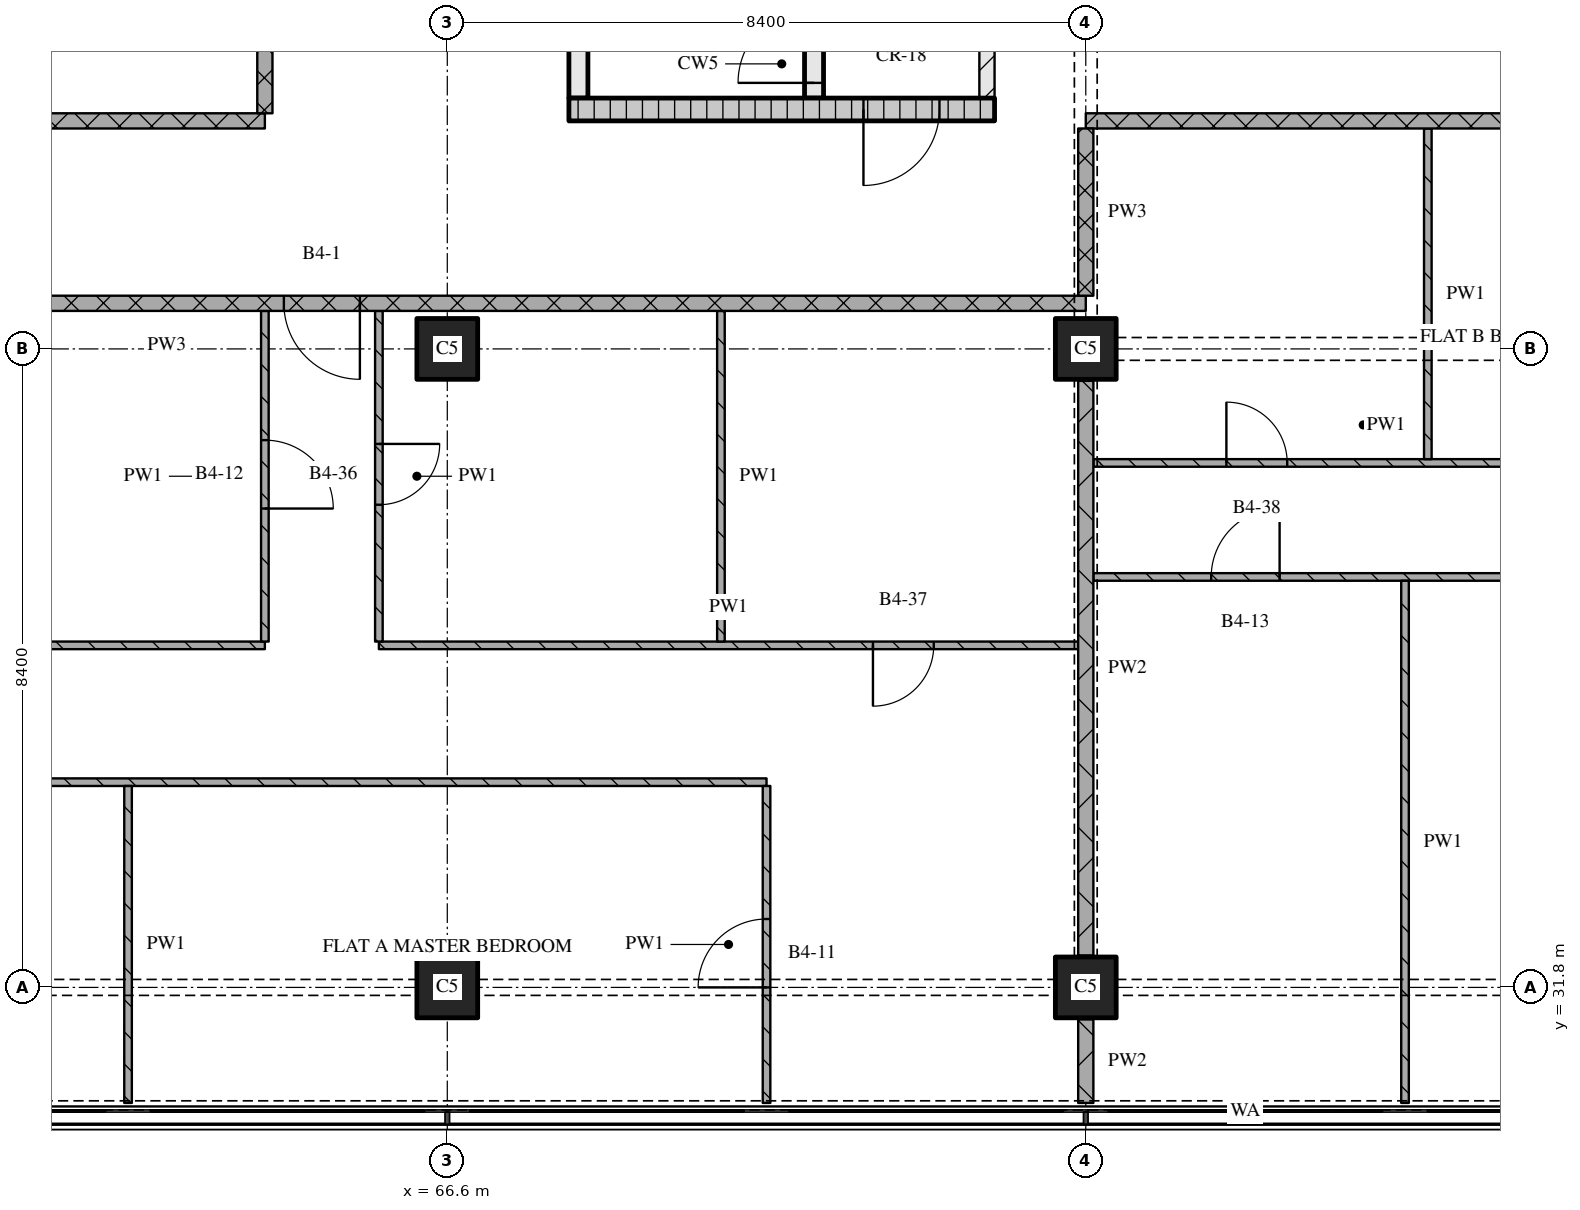
"""IFC4 building model, lengths in metres.
Left out: names, types, materials, properties, quantities, classifications, styles, units other than length and angle.
Written with IfcOpenShell. Run it as: python <this file> out.ifc"""

import sys

from ifc_helpers import new_model, si_unit, direction, frame, frame_2d, origin, origin_2d, place, context, subcontext, project, spatial, rectangle, extrude, element, fill, save


model = new_model("IFC4")
c1 = context("Model", 3, precision=1e-05, world=origin(), true_north=direction((0.0, 1.0)))
c2 = subcontext(c1, "Body", "Model", "MODEL_VIEW")
j1 = project(units=[si_unit("LENGTHUNIT", "METRE"), si_unit("PLANEANGLEUNIT", "RADIAN")], contexts=[c1])
p1 = place(None, origin())
s1 = spatial("IfcSite", under=j1, at=p1, CompositionType="ELEMENT")
p2 = place(p1, origin())
s2 = spatial("IfcBuilding", under=s1, at=p2, CompositionType="ELEMENT")
p3 = place(p2, frame((0.0, 0.0, 131.25)))
s3 = spatial("IfcBuildingStorey", under=s2, at=p3, CompositionType="ELEMENT", Elevation=131.25)
for number, where, z_axis, x_axis in (
    (1, (66.6, 31.8, 0.0), (0.0, 0.0, 1.0), (1.0, 0.0, 0.0)),
    (2, (66.6, 40.2, 0.0), (0.0, 0.0, 1.0), (1.0, 0.0, 0.0)),
    (3, (75.0, 31.8, 0.0), (0.0, 0.0, 1.0), (1.0, 0.0, 0.0)),
    (4, (75.0, 40.2, 0.0), (0.0, 0.0, 1.0), (1.0, 0.0, 0.0)),
):
    element("IfcColumn", number, at=place(p3, frame(where, z_axis=z_axis, x_axis=x_axis)), inside=s3, PredefinedType="COLUMN", context=c2, shape_type="SweptSolid", body=[
        extrude(rectangle(XDim=0.8, YDim=0.8, at=origin_2d()), origin(), (0.0, 0.0, 1.0), 3.6),
    ])
p4 = place(p3, frame((68.2, 43.35, 0.0), z_axis=(0.0, 0.0, 1.0), x_axis=(1.0, 0.0, 0.0)))
e5 = element("IfcWall", 5, at=p4, inside=s3, PredefinedType="SOLIDWALL", context=c2, shape_type="SweptSolid", body=[
    extrude(rectangle(XDim=5.6, YDim=0.3, at=frame_2d((2.8, 0.0))), origin(), (0.0, 0.0, 1.0), 3.32),
])
p5 = place(p4, frame((3.875, 0.0, 0.0)))
e6 = element("IfcOpeningElement", 6, at=p5, cuts=e5, PredefinedType="OPENING", context=c2, shape_type="SweptSolid", body=[
    extrude(rectangle(XDim=1.0, YDim=2.1, at=frame_2d((0.5, 1.05))), frame((0.0, 0.16, 0.0), z_axis=(0.0, -1.0, 0.0), x_axis=(1.0, 0.0, 0.0)), (0.0, 0.0, 1.0), 0.32),
])
p6 = place(p3, frame((68.325, 43.5, 0.0), z_axis=(0.0, 0.0, 1.0), x_axis=(0.0, 1.0, 0.0)))
e7 = element("IfcWall", 7, at=p6, inside=s3, PredefinedType="SOLIDWALL", context=c2, shape_type="SweptSolid", body=[
    extrude(rectangle(XDim=6.9, YDim=0.25, at=frame_2d((3.45, 0.0))), origin(), (0.0, 0.0, 1.0), 3.32),
])
p7 = place(p3, frame((71.425, 43.5, 0.0), z_axis=(0.0, 0.0, 1.0), x_axis=(0.0, 1.0, 0.0)))
e8 = element("IfcWall", 8, at=p7, inside=s3, PredefinedType="SOLIDWALL", context=c2, shape_type="SweptSolid", body=[
    extrude(rectangle(XDim=6.9, YDim=0.25, at=frame_2d((3.45, 0.0))), origin(), (0.0, 0.0, 1.0), 3.32),
])
p8 = place(p7, frame((0.2, 0.0, 0.0)))
e9 = element("IfcOpeningElement", 9, at=p8, cuts=e8, PredefinedType="OPENING", context=c2, shape_type="SweptSolid", body=[
    extrude(rectangle(XDim=1.0, YDim=2.1, at=frame_2d((0.5, 1.05))), frame((0.0, 0.135, 0.0), z_axis=(0.0, -1.0, 0.0), x_axis=(1.0, 0.0, 0.0)), (0.0, 0.0, 1.0), 0.27),
])
p9 = place(p3, frame((73.7, 43.5, 0.0), z_axis=(0.0, 0.0, 1.0), x_axis=(0.0, 1.0, 0.0)))
e10 = element("IfcWall", 10, at=p9, inside=s3, PredefinedType="PARTITIONING", context=c2, shape_type="SweptSolid", body=[
    extrude(rectangle(XDim=6.9, YDim=0.2, at=frame_2d((3.45, 0.0))), origin(), (0.0, 0.0, 1.0), 3.32),
])
p10 = place(p9, frame((1.0, 0.0, 0.0)))
e11 = element("IfcOpeningElement", 11, at=p10, cuts=e10, PredefinedType="OPENING", context=c2, shape_type="SweptSolid", body=[
    extrude(rectangle(XDim=1.0, YDim=2.1, at=frame_2d((0.5, 1.05))), frame((0.0, 0.11, 0.0), z_axis=(0.0, -1.0, 0.0), x_axis=(1.0, 0.0, 0.0)), (0.0, 0.0, 1.0), 0.22),
])
p11 = place(p3, frame((70.8, 34.5, 0.0), z_axis=(0.0, 0.0, 1.0), x_axis=(-1.0, 0.0, 0.0)))
e12 = element("IfcWall", 12, at=p11, inside=s3, PredefinedType="PARTITIONING", context=c2, shape_type="SweptSolid", body=[
    extrude(rectangle(XDim=22.52, YDim=0.1, at=frame_2d((11.26, 0.0))), origin(), (0.0, 0.0, 1.0), 3.32),
])
p12 = place(p11, frame((10.05, 0.0, 0.0)))
e13 = element("IfcOpeningElement", 13, at=p12, cuts=e12, PredefinedType="OPENING", context=c2, shape_type="SweptSolid", body=[
    extrude(rectangle(XDim=0.9, YDim=2.1, at=frame_2d((0.45, 1.05))), frame((0.0, 0.06, 0.0), z_axis=(0.0, -1.0, 0.0), x_axis=(1.0, 0.0, 0.0)), (0.0, 0.0, 1.0), 0.12),
])
p13 = place(p11, frame((14.25, 0.0, 0.0)))
e14 = element("IfcOpeningElement", 14, at=p13, cuts=e12, PredefinedType="OPENING", context=c2, shape_type="SweptSolid", body=[
    extrude(rectangle(XDim=0.9, YDim=2.1, at=frame_2d((0.45, 1.05))), frame((0.0, 0.06, 0.0), z_axis=(0.0, -1.0, 0.0), x_axis=(1.0, 0.0, 0.0)), (0.0, 0.0, 1.0), 0.12),
])
p14 = place(p11, frame((17.654, 0.0, 0.0)))
e15 = element("IfcOpeningElement", 15, at=p14, cuts=e12, PredefinedType="OPENING", context=c2, shape_type="SweptSolid", body=[
    extrude(rectangle(XDim=0.9, YDim=2.1, at=frame_2d((0.45, 1.05))), frame((0.0, 0.06, 0.0), z_axis=(0.0, -1.0, 0.0), x_axis=(1.0, 0.0, 0.0)), (0.0, 0.0, 1.0), 0.12),
])
p15 = place(p3, frame((55.5, 36.3, 0.0), z_axis=(0.0, 0.0, 1.0), x_axis=(1.0, 0.0, 0.0)))
e16 = element("IfcWall", 16, at=p15, inside=s3, PredefinedType="PARTITIONING", context=c2, shape_type="SweptSolid", body=[
    extrude(rectangle(XDim=8.7, YDim=0.1, at=frame_2d((4.35, 0.0))), origin(), (0.0, 0.0, 1.0), 3.32),
])
p16 = place(p3, frame((65.7, 36.3, 0.0), z_axis=(0.0, 0.0, 1.0), x_axis=(1.0, 0.0, 0.0)))
e17 = element("IfcWall", 17, at=p16, inside=s3, PredefinedType="PARTITIONING", context=c2, shape_type="SweptSolid", body=[
    extrude(rectangle(XDim=9.2, YDim=0.1, at=frame_2d((4.6, 0.0))), origin(), (0.0, 0.0, 1.0), 3.32),
])
p17 = place(p16, frame((6.5, 0.0, 0.0)))
e18 = element("IfcOpeningElement", 18, at=p17, cuts=e17, PredefinedType="OPENING", context=c2, shape_type="SweptSolid", body=[
    extrude(rectangle(XDim=0.8, YDim=2.1, at=frame_2d((0.4, 1.05))), frame((0.0, 0.06, 0.0), z_axis=(0.0, -1.0, 0.0), x_axis=(1.0, 0.0, 0.0)), (0.0, 0.0, 1.0), 0.12),
])
p18 = place(p3, frame((96.0, 37.2, 0.0), z_axis=(0.0, 0.0, 1.0), x_axis=(-1.0, 0.0, 0.0)))
e19 = element("IfcWall", 19, at=p18, inside=s3, PredefinedType="PARTITIONING", context=c2, shape_type="SweptSolid", body=[
    extrude(rectangle(XDim=20.9, YDim=0.1, at=frame_2d((10.45, 0.0))), origin(), (0.0, 0.0, 1.0), 3.32),
])
p19 = place(p18, frame((10.05, 0.0, 0.0)))
e20 = element("IfcOpeningElement", 20, at=p19, cuts=e19, PredefinedType="OPENING", context=c2, shape_type="SweptSolid", body=[
    extrude(rectangle(XDim=0.9, YDim=2.1, at=frame_2d((0.45, 1.05))), frame((0.0, 0.06, 0.0), z_axis=(0.0, -1.0, 0.0), x_axis=(1.0, 0.0, 0.0)), (0.0, 0.0, 1.0), 0.12),
])
p20 = place(p18, frame((14.25, 0.0, 0.0)))
e21 = element("IfcOpeningElement", 21, at=p20, cuts=e19, PredefinedType="OPENING", context=c2, shape_type="SweptSolid", body=[
    extrude(rectangle(XDim=0.9, YDim=2.1, at=frame_2d((0.45, 1.05))), frame((0.0, 0.06, 0.0), z_axis=(0.0, -1.0, 0.0), x_axis=(1.0, 0.0, 0.0)), (0.0, 0.0, 1.0), 0.12),
])
p21 = place(p18, frame((18.45, 0.0, 0.0)))
e22 = element("IfcOpeningElement", 22, at=p21, cuts=e19, PredefinedType="OPENING", context=c2, shape_type="SweptSolid", body=[
    extrude(rectangle(XDim=0.9, YDim=2.1, at=frame_2d((0.45, 1.05))), frame((0.0, 0.06, 0.0), z_axis=(0.0, -1.0, 0.0), x_axis=(1.0, 0.0, 0.0)), (0.0, 0.0, 1.0), 0.12),
])
p22 = place(p3, frame((75.1, 38.7, 0.0), z_axis=(0.0, 0.0, 1.0), x_axis=(1.0, 0.0, 0.0)))
e23 = element("IfcWall", 23, at=p22, inside=s3, PredefinedType="PARTITIONING", context=c2, shape_type="SweptSolid", body=[
    extrude(rectangle(XDim=7.1, YDim=0.1, at=frame_2d((3.55, 0.0))), origin(), (0.0, 0.0, 1.0), 3.32),
])
p23 = place(p22, frame((1.75, 0.0, 0.0)))
e24 = element("IfcOpeningElement", 24, at=p23, cuts=e23, PredefinedType="OPENING", context=c2, shape_type="SweptSolid", body=[
    extrude(rectangle(XDim=0.8, YDim=2.1, at=frame_2d((0.4, 1.05))), frame((0.0, 0.06, 0.0), z_axis=(0.0, -1.0, 0.0), x_axis=(1.0, 0.0, 0.0)), (0.0, 0.0, 1.0), 0.12),
])
p24 = place(p3, frame((75.0, 40.8, 0.0), z_axis=(0.0, 0.0, 1.0), x_axis=(-1.0, 0.0, 0.0)))
e25 = element("IfcWall", 25, at=p24, inside=s3, PredefinedType="PARTITIONING", context=c2, shape_type="SweptSolid", body=[
    extrude(rectangle(XDim=24.18, YDim=0.2, at=frame_2d((12.09, 0.0))), origin(), (0.0, 0.0, 1.0), 3.32),
])
p25 = place(p24, frame((9.55, 0.0, 0.0)))
e26 = element("IfcOpeningElement", 26, at=p25, cuts=e25, PredefinedType="OPENING", context=c2, shape_type="SweptSolid", body=[
    extrude(rectangle(XDim=1.0, YDim=2.1, at=frame_2d((0.5, 1.05))), frame((0.0, 0.11, 0.0), z_axis=(0.0, -1.0, 0.0), x_axis=(1.0, 0.0, 0.0)), (0.0, 0.0, 1.0), 0.22),
])
p26 = place(p3, frame((48.28, 43.2, 0.0), z_axis=(0.0, 0.0, 1.0), x_axis=(1.0, 0.0, 0.0)))
e27 = element("IfcWall", 27, at=p26, inside=s3, PredefinedType="PARTITIONING", context=c2, shape_type="SweptSolid", body=[
    extrude(rectangle(XDim=15.92, YDim=0.2, at=frame_2d((7.96, 0.0))), origin(), (0.0, 0.0, 1.0), 3.32),
])
p27 = place(p3, frame((100.2, 43.2, 0.0), z_axis=(0.0, 0.0, 1.0), x_axis=(-1.0, 0.0, 0.0)))
e28 = element("IfcWall", 28, at=p27, inside=s3, PredefinedType="PARTITIONING", context=c2, shape_type="SweptSolid", body=[
    extrude(rectangle(XDim=25.2, YDim=0.2, at=frame_2d((12.6, 0.0))), origin(), (0.0, 0.0, 1.0), 3.32),
])
p28 = place(p27, frame((16.75, 0.0, 0.0)))
e29 = element("IfcOpeningElement", 29, at=p28, cuts=e28, PredefinedType="OPENING", context=c2, shape_type="SweptSolid", body=[
    extrude(rectangle(XDim=1.0, YDim=2.1, at=frame_2d((0.5, 1.05))), frame((0.0, 0.11, 0.0), z_axis=(0.0, -1.0, 0.0), x_axis=(1.0, 0.0, 0.0)), (0.0, 0.0, 1.0), 0.22),
])
p29 = place(p3, frame((62.4, 34.45, 0.0), z_axis=(0.0, 0.0, 1.0), x_axis=(0.0, -1.0, 0.0)))
e30 = element("IfcWall", 30, at=p29, inside=s3, PredefinedType="PARTITIONING", context=c2, shape_type="SweptSolid", body=[
    extrude(rectangle(XDim=4.17, YDim=0.1, at=frame_2d((2.085, 0.0))), origin(), (0.0, 0.0, 1.0), 3.32),
])
p30 = place(p3, frame((64.2, 43.3, 0.0), z_axis=(0.0, 0.0, 1.0), x_axis=(0.0, 1.0, 0.0)))
e31 = element("IfcWall", 31, at=p30, inside=s3, PredefinedType="PARTITIONING", context=c2, shape_type="SweptSolid", body=[
    extrude(rectangle(XDim=32.02, YDim=0.2, at=frame_2d((16.01, 0.0))), origin(), (0.0, 0.0, 1.0), 3.32),
])
p31 = place(p30, frame((10.05, 0.0, 0.0)))
e32 = element("IfcOpeningElement", 32, at=p31, cuts=e31, PredefinedType="OPENING", context=c2, shape_type="SweptSolid", body=[
    extrude(rectangle(XDim=1.0, YDim=2.1, at=frame_2d((0.5, 1.05))), frame((0.0, 0.11, 0.0), z_axis=(0.0, -1.0, 0.0), x_axis=(1.0, 0.0, 0.0)), (0.0, 0.0, 1.0), 0.22),
])
p32 = place(p30, frame((25.65, 0.0, 0.0)))
e33 = element("IfcOpeningElement", 33, at=p32, cuts=e31, PredefinedType="OPENING", context=c2, shape_type="SweptSolid", body=[
    extrude(rectangle(XDim=1.0, YDim=2.1, at=frame_2d((0.5, 1.05))), frame((0.0, 0.11, 0.0), z_axis=(0.0, -1.0, 0.0), x_axis=(1.0, 0.0, 0.0)), (0.0, 0.0, 1.0), 0.22),
])
p33 = place(p3, frame((64.2, 36.35, 0.0), z_axis=(0.0, 0.0, 1.0), x_axis=(0.0, 1.0, 0.0)))
e34 = element("IfcWall", 34, at=p33, inside=s3, PredefinedType="PARTITIONING", context=c2, shape_type="SweptSolid", body=[
    extrude(rectangle(XDim=4.35, YDim=0.1, at=frame_2d((2.175, 0.0))), origin(), (0.0, 0.0, 1.0), 3.32),
])
p34 = place(p33, frame((1.75, 0.0, 0.0)))
e35 = element("IfcOpeningElement", 35, at=p34, cuts=e34, PredefinedType="OPENING", context=c2, shape_type="SweptSolid", body=[
    extrude(rectangle(XDim=0.9, YDim=2.1, at=frame_2d((0.45, 1.05))), frame((0.0, 0.06, 0.0), z_axis=(0.0, -1.0, 0.0), x_axis=(1.0, 0.0, 0.0)), (0.0, 0.0, 1.0), 0.12),
])
p35 = place(p3, frame((65.7, 40.7, 0.0), z_axis=(0.0, 0.0, 1.0), x_axis=(0.0, -1.0, 0.0)))
e36 = element("IfcWall", 36, at=p35, inside=s3, PredefinedType="PARTITIONING", context=c2, shape_type="SweptSolid", body=[
    extrude(rectangle(XDim=4.35, YDim=0.1, at=frame_2d((2.175, 0.0))), origin(), (0.0, 0.0, 1.0), 3.32),
])
p36 = place(p35, frame((1.75, 0.0, 0.0)))
e37 = element("IfcOpeningElement", 37, at=p36, cuts=e36, PredefinedType="OPENING", context=c2, shape_type="SweptSolid", body=[
    extrude(rectangle(XDim=0.8, YDim=2.1, at=frame_2d((0.4, 1.05))), frame((0.0, 0.06, 0.0), z_axis=(0.0, -1.0, 0.0), x_axis=(1.0, 0.0, 0.0)), (0.0, 0.0, 1.0), 0.12),
])
p37 = place(p3, frame((70.2, 40.7, 0.0), z_axis=(0.0, 0.0, 1.0), x_axis=(0.0, -1.0, 0.0)))
e38 = element("IfcWall", 38, at=p37, inside=s3, PredefinedType="PARTITIONING", context=c2, shape_type="SweptSolid", body=[
    extrude(rectangle(XDim=4.35, YDim=0.1, at=frame_2d((2.175, 0.0))), origin(), (0.0, 0.0, 1.0), 3.32),
])
p38 = place(p3, frame((70.8, 30.28, 0.0), z_axis=(0.0, 0.0, 1.0), x_axis=(0.0, 1.0, 0.0)))
e39 = element("IfcWall", 39, at=p38, inside=s3, PredefinedType="PARTITIONING", context=c2, shape_type="SweptSolid", body=[
    extrude(rectangle(XDim=4.17, YDim=0.1, at=frame_2d((2.085, 0.0))), origin(), (0.0, 0.0, 1.0), 3.32),
])
p39 = place(p38, frame((1.52, 0.0, 0.0)))
e40 = element("IfcOpeningElement", 40, at=p39, cuts=e39, PredefinedType="OPENING", context=c2, shape_type="SweptSolid", body=[
    extrude(rectangle(XDim=0.9, YDim=2.1, at=frame_2d((0.45, 1.05))), frame((0.0, 0.06, 0.0), z_axis=(0.0, -1.0, 0.0), x_axis=(1.0, 0.0, 0.0)), (0.0, 0.0, 1.0), 0.12),
])
p40 = place(p3, frame((75.0, 43.1, 0.0), z_axis=(0.0, 0.0, 1.0), x_axis=(0.0, -1.0, 0.0)))
e41 = element("IfcWall", 41, at=p40, inside=s3, PredefinedType="PARTITIONING", context=c2, shape_type="SweptSolid", body=[
    extrude(rectangle(XDim=2.2, YDim=0.2, at=frame_2d((1.1, 0.0))), origin(), (0.0, 0.0, 1.0), 2.43),
])
p41 = place(p3, frame((75.0, 31.38, 0.0), z_axis=(0.0, 0.0, 1.0), x_axis=(0.0, -1.0, 0.0)))
e42 = element("IfcWall", 42, at=p41, inside=s3, PredefinedType="PARTITIONING", context=c2, shape_type="SweptSolid", body=[
    extrude(rectangle(XDim=1.1, YDim=0.2, at=frame_2d((0.55, 0.0))), origin(), (0.0, 0.0, 1.0), 3.32),
])
p42 = place(p3, frame((75.0, 39.78, 0.0), z_axis=(0.0, 0.0, 1.0), x_axis=(0.0, -1.0, 0.0)))
e43 = element("IfcWall", 43, at=p42, inside=s3, PredefinedType="PARTITIONING", context=c2, shape_type="SweptSolid", body=[
    extrude(rectangle(XDim=7.56, YDim=0.2, at=frame_2d((3.78, 0.0))), origin(), (0.0, 0.0, 1.0), 2.83),
])
p43 = place(p3, frame((79.2, 37.15, 0.0), z_axis=(0.0, 0.0, 1.0), x_axis=(0.0, -1.0, 0.0)))
e44 = element("IfcWall", 44, at=p43, inside=s3, PredefinedType="PARTITIONING", context=c2, shape_type="SweptSolid", body=[
    extrude(rectangle(XDim=6.87, YDim=0.1, at=frame_2d((3.435, 0.0))), origin(), (0.0, 0.0, 1.0), 3.32),
])
p44 = place(p3, frame((79.5, 43.1, 0.0), z_axis=(0.0, 0.0, 1.0), x_axis=(0.0, -1.0, 0.0)))
e45 = element("IfcWall", 45, at=p44, inside=s3, PredefinedType="PARTITIONING", context=c2, shape_type="SweptSolid", body=[
    extrude(rectangle(XDim=4.35, YDim=0.1, at=frame_2d((2.175, 0.0))), origin(), (0.0, 0.0, 1.0), 3.32),
])
p45 = place(p5, origin())
e46 = element("IfcDoor", 46, at=p45, inside=s3, OperationType="SINGLE_SWING_RIGHT", PredefinedType="DOOR", context=c2, shape_type="SweptSolid", body=[
    extrude(rectangle(XDim=1.0, YDim=2.1, at=frame_2d((0.5, 1.05))), frame((0.0, 0.025, 0.0), z_axis=(0.0, -1.0, 0.0), x_axis=(1.0, 0.0, 0.0)), (0.0, 0.0, 1.0), 0.05),
])
fill(e6, e46)
p46 = place(p8, origin())
e47 = element("IfcDoor", 47, at=p46, inside=s3, OperationType="SINGLE_SWING_LEFT", PredefinedType="DOOR", context=c2, shape_type="SweptSolid", body=[
    extrude(rectangle(XDim=1.0, YDim=2.1, at=frame_2d((0.5, 1.05))), frame((0.0, 0.025, 0.0), z_axis=(0.0, -1.0, 0.0), x_axis=(1.0, 0.0, 0.0)), (0.0, 0.0, 1.0), 0.05),
])
fill(e9, e47)
p47 = place(p17, origin())
e48 = element("IfcDoor", 48, at=p47, inside=s3, OperationType="SINGLE_SWING_RIGHT", PredefinedType="DOOR", context=c2, shape_type="SweptSolid", body=[
    extrude(rectangle(XDim=0.8, YDim=2.1, at=frame_2d((0.4, 1.05))), frame((0.0, 0.025, 0.0), z_axis=(0.0, -1.0, 0.0), x_axis=(1.0, 0.0, 0.0)), (0.0, 0.0, 1.0), 0.05),
])
fill(e18, e48)
p48 = place(p21, origin())
e49 = element("IfcDoor", 49, at=p48, inside=s3, OperationType="SINGLE_SWING_RIGHT", PredefinedType="DOOR", context=c2, shape_type="SweptSolid", body=[
    extrude(rectangle(XDim=0.9, YDim=2.1, at=frame_2d((0.45, 1.05))), frame((0.0, 0.025, 0.0), z_axis=(0.0, -1.0, 0.0), x_axis=(1.0, 0.0, 0.0)), (0.0, 0.0, 1.0), 0.05),
])
fill(e22, e49)
p49 = place(p23, origin())
e50 = element("IfcDoor", 50, at=p49, inside=s3, OperationType="SINGLE_SWING_LEFT", PredefinedType="DOOR", context=c2, shape_type="SweptSolid", body=[
    extrude(rectangle(XDim=0.8, YDim=2.1, at=frame_2d((0.4, 1.05))), frame((0.0, 0.025, 0.0), z_axis=(0.0, -1.0, 0.0), x_axis=(1.0, 0.0, 0.0)), (0.0, 0.0, 1.0), 0.05),
])
fill(e24, e50)
p50 = place(p25, origin())
e51 = element("IfcDoor", 51, at=p50, inside=s3, OperationType="SINGLE_SWING_LEFT", PredefinedType="DOOR", context=c2, shape_type="SweptSolid", body=[
    extrude(rectangle(XDim=1.0, YDim=2.1, at=frame_2d((0.5, 1.05))), frame((0.0, 0.025, 0.0), z_axis=(0.0, -1.0, 0.0), x_axis=(1.0, 0.0, 0.0)), (0.0, 0.0, 1.0), 0.05),
])
fill(e26, e51)
p51 = place(p34, origin())
e52 = element("IfcDoor", 52, at=p51, inside=s3, OperationType="SINGLE_SWING_RIGHT", PredefinedType="DOOR", context=c2, shape_type="SweptSolid", body=[
    extrude(rectangle(XDim=0.9, YDim=2.1, at=frame_2d((0.45, 1.05))), frame((0.0, 0.025, 0.0), z_axis=(0.0, -1.0, 0.0), x_axis=(1.0, 0.0, 0.0)), (0.0, 0.0, 1.0), 0.05),
])
fill(e35, e52)
p52 = place(p36, origin())
e53 = element("IfcDoor", 53, at=p52, inside=s3, OperationType="SINGLE_SWING_LEFT", PredefinedType="DOOR", context=c2, shape_type="SweptSolid", body=[
    extrude(rectangle(XDim=0.8, YDim=2.1, at=frame_2d((0.4, 1.05))), frame((0.0, 0.025, 0.0), z_axis=(0.0, -1.0, 0.0), x_axis=(1.0, 0.0, 0.0)), (0.0, 0.0, 1.0), 0.05),
])
fill(e37, e53)
p53 = place(p39, origin())
e54 = element("IfcDoor", 54, at=p53, inside=s3, OperationType="SINGLE_SWING_LEFT", PredefinedType="DOOR", context=c2, shape_type="SweptSolid", body=[
    extrude(rectangle(XDim=0.9, YDim=2.1, at=frame_2d((0.45, 1.05))), frame((0.0, 0.025, 0.0), z_axis=(0.0, -1.0, 0.0), x_axis=(1.0, 0.0, 0.0)), (0.0, 0.0, 1.0), 0.05),
])
fill(e40, e54)
save(model, sys.argv[1])
